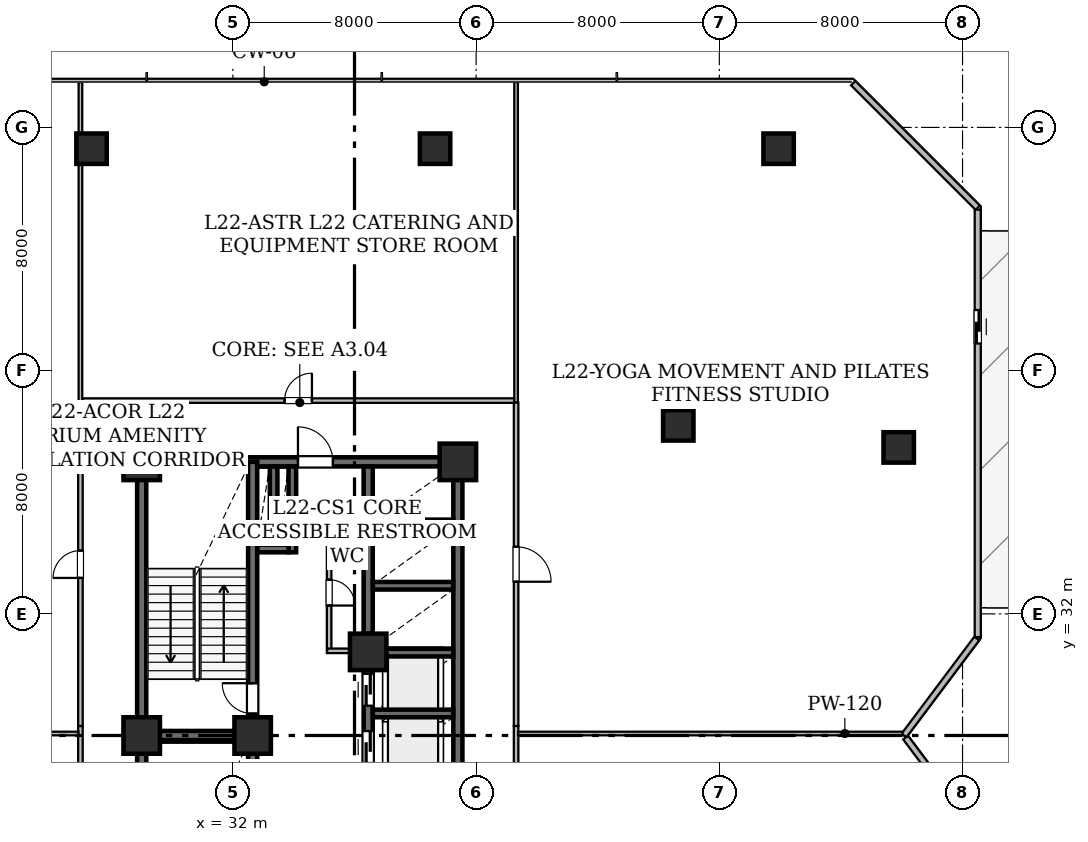
"""IFC4 building model, lengths in metres.
Left out: names, types, materials, properties, quantities, classifications, styles, units other than length and angle.
Written with IfcOpenShell. Run it as: python <this file> out.ifc"""

import sys

from ifc_helpers import new_model, si_unit, direction, frame, frame_2d, origin, origin_2d, place, context, subcontext, project, spatial, rectangle, hollow_rectangle, extrude, element, fill, save


model = new_model("IFC4")
c1 = context("Model", 3, precision=1e-05, world=origin(), true_north=direction((0.0, 1.0)))
c2 = subcontext(c1, "Body", "Model", "MODEL_VIEW")
j1 = project(units=[si_unit("LENGTHUNIT", "METRE"), si_unit("PLANEANGLEUNIT", "RADIAN")], contexts=[c1])
p1 = place(None, origin())
s1 = spatial("IfcSite", under=j1, at=p1, CompositionType="ELEMENT")
p2 = place(p1, origin())
s2 = spatial("IfcBuilding", under=s1, at=p2, CompositionType="ELEMENT")
p3 = place(p2, frame((0.0, 0.0, 89.8)))
s3 = spatial("IfcBuildingStorey", under=s2, at=p3, CompositionType="ELEMENT", Elevation=89.8)
for number, where, z_axis, x_axis in (
    (1, (32.65, 28.0, 0.0), (0.0, 0.0, 1.0), (1.0, 0.0, 0.0)),
    (2, (29.0, 28.0, 0.0), (0.0, 0.0, 1.0), (1.0, 0.0, 0.0)),
    (3, (29.0, 37.0, 0.0), (0.0, 0.0, 1.0), (1.0, 0.0, 0.0)),
    (4, (36.45, 30.75, 0.0), (0.0, 0.0, 1.0), (1.0, 0.0, 0.0)),
    (5, (39.4, 37.0, 0.0), (0.0, 0.0, 1.0), (1.0, 0.0, 0.0)),
):
    element("IfcColumn", number, at=place(p3, frame(where, z_axis=z_axis, x_axis=x_axis)), inside=s3, PredefinedType="COLUMN", context=c2, shape_type="SweptSolid", body=[
        extrude(hollow_rectangle(XDim=1.2, YDim=1.2, WallThickness=0.06, at=origin_2d()), origin(), (0.0, 0.0, 1.0), 4.8),
    ])
for number, where, z_axis, x_axis in (
    (6, (27.35, 47.3, 0.025), (0.0, 0.0, 1.0), (1.0, 0.0, 0.0)),
    (7, (38.65, 47.3, 0.025), (0.0, 0.0, 1.0), (1.0, 0.0, 0.0)),
    (8, (49.95, 47.3, 0.025), (0.0, 0.0, 1.0), (1.0, 0.0, 0.0)),
    (9, (53.9, 37.475, 0.025), (0.0, 0.0, 1.0), (1.0, 0.0, 0.0)),
    (10, (46.65, 38.2, 0.025), (0.0, 0.0, 1.0), (1.0, 0.0, 0.0)),
):
    element("IfcColumn", number, at=place(p3, frame(where, z_axis=z_axis, x_axis=x_axis)), inside=s3, PredefinedType="COLUMN", context=c2, shape_type="SweptSolid", body=[
        extrude(hollow_rectangle(XDim=1.0, YDim=1.0, WallThickness=0.05, at=origin_2d()), origin(), (0.0, 0.0, 1.0), 4.775),
    ])
p4 = place(p3, frame((52.404, 49.455, 0.0), z_axis=(0.0, 0.0, 1.0), x_axis=(0.707085707805, -0.70712785394, 0.0)))
e11 = element("IfcWall", 11, at=p4, inside=s3, PredefinedType="STANDARD", context=c2, shape_type="SweptSolid", body=[
    extrude(rectangle(XDim=5.793, YDim=0.2, at=frame_2d((2.896, 0.0))), origin(), (0.0, 0.0, 1.0), 4.58),
])
p5 = place(p3, frame((56.5, 45.296, 0.0), z_axis=(0.0, 0.0, 1.0), x_axis=(0.0, -1.0, 0.0)))
e12 = element("IfcWall", 12, at=p5, inside=s3, PredefinedType="STANDARD", context=c2, shape_type="SweptSolid", body=[
    extrude(rectangle(XDim=14.063, YDim=0.2, at=frame_2d((7.031, 0.0))), origin(), (0.0, 0.0, 1.0), 4.58),
])
p6 = place(p5, frame((3.303, 0.0, 0.0)))
e13 = element("IfcOpeningElement", 13, at=p6, cuts=e12, PredefinedType="OPENING", context=c2, shape_type="SweptSolid", body=[
    extrude(rectangle(XDim=1.1, YDim=2.2, at=frame_2d((0.55, 1.1))), frame((0.0, 0.11, 0.0), z_axis=(0.0, -1.0, 0.0), x_axis=(1.0, 0.0, 0.0)), (0.0, 0.0, 1.0), 0.22),
])
p7 = place(p3, frame((56.469, 31.191, 0.0), z_axis=(0.0, 0.0, 1.0), x_axis=(-0.600137081448, -0.799897170561, 0.0)))
e14 = element("IfcWall", 14, at=p7, inside=s3, PredefinedType="STANDARD", context=c2, shape_type="SweptSolid", body=[
    extrude(rectangle(XDim=3.989, YDim=0.2, at=frame_2d((1.995, 0.0))), origin(), (0.0, 0.0, 1.0), 4.58),
])
p8 = place(p3, frame((54.127, 27.931, 0.0), z_axis=(0.0, 0.0, 1.0), x_axis=(0.600029630681, -0.799977776132, 0.0)))
e15 = element("IfcWall", 15, at=p8, inside=s3, PredefinedType="STANDARD", context=c2, shape_type="SweptSolid", body=[
    extrude(rectangle(XDim=3.955, YDim=0.2, at=frame_2d((1.978, 0.0))), origin(), (0.0, 0.0, 1.0), 4.58),
])
for number, where, z_axis, x_axis in (
    (16, (29.0, 19.0, 0.0), (0.0, 0.0, 1.0), (0.0, 1.0, 0.0)),
    (17, (29.0, 28.0, 0.0), (0.0, 0.0, 1.0), (0.0, 1.0, 0.0)),
):
    element("IfcWall", number, at=place(p3, frame(where, z_axis=z_axis, x_axis=x_axis)), inside=s3, PredefinedType="SHEAR", context=c2, shape_type="SweptSolid", body=[
        extrude(rectangle(XDim=9.0, YDim=0.3, at=frame_2d((4.5, 0.0))), origin(), (0.0, 0.0, 1.0), 4.58),
    ])
p9 = place(p3, frame((29.0, 37.0, 0.0), z_axis=(0.0, 0.0, 1.0), x_axis=(1.0, 0.0, 0.0)))
e18 = element("IfcWall", 18, at=p9, inside=s3, PredefinedType="SHEAR", context=c2, shape_type="SweptSolid", body=[
    extrude(rectangle(XDim=10.4, YDim=0.3, at=frame_2d((5.2, 0.0))), origin(), (0.0, 0.0, 1.0), 4.58),
])
p10 = place(p9, frame((5.14, 0.0, 0.0)))
e19 = element("IfcOpeningElement", 19, at=p10, cuts=e18, PredefinedType="OPENING", context=c2, shape_type="SweptSolid", body=[
    extrude(rectangle(XDim=1.15, YDim=2.2, at=frame_2d((0.575, 1.1))), frame((0.0, 0.16, 0.0), z_axis=(0.0, -1.0, 0.0), x_axis=(1.0, 0.0, 0.0)), (0.0, 0.0, 1.0), 0.32),
])
p11 = place(p3, frame((39.4, 24.4, 0.0), z_axis=(0.0, 0.0, 1.0), x_axis=(0.0, 1.0, 0.0)))
e20 = element("IfcWall", 20, at=p11, inside=s3, PredefinedType="SHEAR", context=c2, shape_type="SweptSolid", body=[
    extrude(rectangle(XDim=12.6, YDim=0.3, at=frame_2d((6.3, 0.0))), origin(), (0.0, 0.0, 1.0), 4.58),
])
p12 = place(p3, frame((32.65, 19.0, 0.0), z_axis=(0.0, 0.0, 1.0), x_axis=(0.0, 1.0, 0.0)))
e21 = element("IfcWall", 21, at=p12, inside=s3, PredefinedType="SHEAR", context=c2, shape_type="SweptSolid", body=[
    extrude(rectangle(XDim=9.0, YDim=0.3, at=frame_2d((4.5, 0.0))), origin(), (0.0, 0.0, 1.0), 4.58),
])
p13 = place(p12, frame((0.72, 0.0, 0.0)))
e22 = element("IfcOpeningElement", 22, at=p13, cuts=e21, PredefinedType="OPENING", context=c2, shape_type="SweptSolid", body=[
    extrude(rectangle(XDim=1.0, YDim=2.15, at=frame_2d((0.5, 1.075))), frame((0.0, 0.16, 0.0), z_axis=(0.0, -1.0, 0.0), x_axis=(1.0, 0.0, 0.0)), (0.0, 0.0, 1.0), 0.32),
])
p14 = place(p3, frame((32.65, 28.0, 0.0), z_axis=(0.0, 0.0, 1.0), x_axis=(0.0, 1.0, 0.0)))
e23 = element("IfcWall", 23, at=p14, inside=s3, PredefinedType="SHEAR", context=c2, shape_type="SweptSolid", body=[
    extrude(rectangle(XDim=9.0, YDim=0.3, at=frame_2d((4.5, 0.0))), origin(), (0.0, 0.0, 1.0), 4.58),
])
p15 = place(p14, frame((0.72, 0.0, 0.0)))
e24 = element("IfcOpeningElement", 24, at=p15, cuts=e23, PredefinedType="OPENING", context=c2, shape_type="SweptSolid", body=[
    extrude(rectangle(XDim=1.0, YDim=2.15, at=frame_2d((0.5, 1.075))), frame((0.0, 0.16, 0.0), z_axis=(0.0, -1.0, 0.0), x_axis=(1.0, 0.0, 0.0)), (0.0, 0.0, 1.0), 0.32),
])
p16 = place(p3, frame((29.0, 28.0, 0.0), z_axis=(0.0, 0.0, 1.0), x_axis=(1.0, 0.0, 0.0)))
e25 = element("IfcWall", 25, at=p16, inside=s3, PredefinedType="SHEAR", context=c2, shape_type="SweptSolid", body=[
    extrude(rectangle(XDim=3.65, YDim=0.3, at=frame_2d((1.825, 0.0))), origin(), (0.0, 0.0, 1.0), 4.58),
])
p17 = place(p3, frame((36.45, 25.0, 0.0), z_axis=(0.0, 0.0, 1.0), x_axis=(0.0, 1.0, 0.0)))
e26 = element("IfcWall", 26, at=p17, inside=s3, PredefinedType="SHEAR", context=c2, shape_type="SweptSolid", body=[
    extrude(rectangle(XDim=5.15, YDim=0.3, at=frame_2d((2.575, 0.0))), origin(), (0.0, 0.0, 1.0), 4.58),
])
p18 = place(p17, frame((0.12, 0.0, 0.0)))
e27 = element("IfcOpeningElement", 27, at=p18, cuts=e26, PredefinedType="OPENING", context=c2, shape_type="SweptSolid", body=[
    extrude(rectangle(XDim=1.05, YDim=2.15, at=frame_2d((0.525, 1.075))), frame((0.0, 0.16, 0.0), z_axis=(0.0, -1.0, 0.0), x_axis=(1.0, 0.0, 0.0)), (0.0, 0.0, 1.0), 0.32),
])
p19 = place(p17, frame((2.095, 0.0, 0.0)))
e28 = element("IfcOpeningElement", 28, at=p19, cuts=e26, PredefinedType="OPENING", context=c2, shape_type="SweptSolid", body=[
    extrude(rectangle(XDim=1.05, YDim=2.15, at=frame_2d((0.525, 1.075))), frame((0.0, 0.16, 0.0), z_axis=(0.0, -1.0, 0.0), x_axis=(1.0, 0.0, 0.0)), (0.0, 0.0, 1.0), 0.32),
])
p20 = place(p17, frame((3.98, 0.0, 0.0)))
e29 = element("IfcOpeningElement", 29, at=p20, cuts=e26, PredefinedType="OPENING", context=c2, shape_type="SweptSolid", body=[
    extrude(rectangle(XDim=1.05, YDim=2.15, at=frame_2d((0.525, 1.075))), frame((0.0, 0.16, 0.0), z_axis=(0.0, -1.0, 0.0), x_axis=(1.0, 0.0, 0.0)), (0.0, 0.0, 1.0), 0.32),
])
p21 = place(p3, frame((36.45, 31.35, 0.0), z_axis=(0.0, 0.0, 1.0), x_axis=(0.0, 1.0, 0.0)))
e30 = element("IfcWall", 30, at=p21, inside=s3, PredefinedType="SHEAR", context=c2, shape_type="SweptSolid", body=[
    extrude(rectangle(XDim=5.496, YDim=0.3, at=frame_2d((2.748, 0.0))), origin(), (0.0, 0.0, 1.0), 4.58),
])
for number, where, z_axis, x_axis in (
    (31, (36.604, 28.725, 0.0), (0.0, 0.0, 1.0), (1.0, 0.0, 0.0)),
    (32, (36.604, 30.725, 0.0), (0.0, 0.0, 1.0), (1.0, 0.0, 0.0)),
    (33, (36.604, 32.925, 0.0), (0.0, 0.0, 1.0), (1.0, 0.0, 0.0)),
    (34, (36.604, 34.975, 0.0), (0.0, 0.0, 1.0), (1.0, 0.0, 0.0)),
):
    element("IfcWall", number, at=place(p3, frame(where, z_axis=z_axis, x_axis=x_axis)), inside=s3, PredefinedType="SHEAR", context=c2, shape_type="SweptSolid", body=[
        extrude(rectangle(XDim=2.642, YDim=0.25, at=frame_2d((1.321, 0.0))), origin(), (0.0, 0.0, 1.0), 4.58),
    ])
p22 = place(p3, frame((33.955, 34.025, 0.0), z_axis=(0.0, 0.0, 1.0), x_axis=(0.0, 1.0, 0.0)))
e35 = element("IfcWall", 35, at=p22, inside=s3, PredefinedType="SHEAR", context=c2, shape_type="SweptSolid", body=[
    extrude(rectangle(XDim=2.821, YDim=0.25, at=frame_2d((1.411, 0.0))), origin(), (0.0, 0.0, 1.0), 4.58),
])
p23 = place(p3, frame((32.804, 34.15, 0.0), z_axis=(0.0, 0.0, 1.0), x_axis=(1.0, 0.0, 0.0)))
e36 = element("IfcWall", 36, at=p23, inside=s3, PredefinedType="SHEAR", context=c2, shape_type="SweptSolid", body=[
    extrude(rectangle(XDim=1.022, YDim=0.25, at=frame_2d((0.511, 0.0))), origin(), (0.0, 0.0, 1.0), 4.58),
])
p24 = place(p3, frame((33.34, 34.279, 0.0), z_axis=(0.0, 0.0, 1.0), x_axis=(0.0, 1.0, 0.0)))
e37 = element("IfcWall", 37, at=p24, inside=s3, PredefinedType="SHEAR", context=c2, shape_type="SweptSolid", body=[
    extrude(rectangle(XDim=2.567, YDim=0.25, at=frame_2d((1.283, 0.0))), origin(), (0.0, 0.0, 1.0), 4.58),
])
p25 = place(p3, frame((36.306, 34.615, 0.0), z_axis=(0.0, 0.0, 1.0), x_axis=(-1.0, 0.0, 0.0)))
e38 = element("IfcWall", 38, at=p25, inside=s3, PredefinedType="STANDARD", context=c2, shape_type="SweptSolid", body=[
    extrude(rectangle(XDim=1.206, YDim=0.15, at=frame_2d((0.603, 0.0))), origin(), (0.0, 0.0, 1.0), 4.58),
])
p26 = place(p3, frame((35.165, 34.678, 0.0), z_axis=(0.0, 0.0, 1.0), x_axis=(0.0, -1.0, 0.0)))
e39 = element("IfcWall", 39, at=p26, inside=s3, PredefinedType="STANDARD", context=c2, shape_type="SweptSolid", body=[
    extrude(rectangle(XDim=3.958, YDim=0.15, at=frame_2d((1.979, 0.0))), origin(), (0.0, 0.0, 1.0), 4.58),
])
p27 = place(p26, frame((1.554, 0.0, 0.0)))
e40 = element("IfcOpeningElement", 40, at=p27, cuts=e39, PredefinedType="OPENING", context=c2, shape_type="SweptSolid", body=[
    extrude(rectangle(XDim=0.85, YDim=2.1, at=frame_2d((0.425, 1.05))), frame((0.0, 0.085, 0.0), z_axis=(0.0, -1.0, 0.0), x_axis=(1.0, 0.0, 0.0)), (0.0, 0.0, 1.0), 0.17),
])
p28 = place(p3, frame((35.102, 30.785, 0.0), z_axis=(0.0, 0.0, 1.0), x_axis=(1.0, 0.0, 0.0)))
e41 = element("IfcWall", 41, at=p28, inside=s3, PredefinedType="STANDARD", context=c2, shape_type="SweptSolid", body=[
    extrude(rectangle(XDim=1.198, YDim=0.15, at=frame_2d((0.599, 0.0))), origin(), (0.0, 0.0, 1.0), 4.58),
])
p29 = place(p3, frame((41.315, 28.314, 0.0), z_axis=(0.0, 0.0, 1.0), x_axis=(0.0, -1.0, 0.0)))
e42 = element("IfcWall", 42, at=p29, inside=s3, PredefinedType="STANDARD", context=c2, shape_type="SweptSolid", body=[
    extrude(rectangle(XDim=11.264, YDim=0.15, at=frame_2d((5.632, 0.0))), origin(), (0.0, 0.0, 1.0), 3.797),
])
p30 = place(p29, frame((5.203, 0.0, 0.0)))
e43 = element("IfcOpeningElement", 43, at=p30, cuts=e42, PredefinedType="OPENING", context=c2, shape_type="SweptSolid", body=[
    extrude(rectangle(XDim=0.9, YDim=2.1, at=frame_2d((0.45, 1.05))), frame((0.0, 0.085, 0.0), z_axis=(0.0, -1.0, 0.0), x_axis=(1.0, 0.0, 0.0)), (0.0, 0.0, 1.0), 0.17),
])
p31 = place(p3, frame((26.985, 17.05, 0.0), z_axis=(0.0, 0.0, 1.0), x_axis=(0.0, 1.0, 0.0)))
e44 = element("IfcWall", 44, at=p31, inside=s3, PredefinedType="STANDARD", context=c2, shape_type="SweptSolid", body=[
    extrude(rectangle(XDim=11.264, YDim=0.15, at=frame_2d((5.632, 0.0))), origin(), (0.0, 0.0, 1.0), 3.797),
])
p32 = place(p31, frame((5.036, 0.0, 0.0)))
e45 = element("IfcOpeningElement", 45, at=p32, cuts=e44, PredefinedType="OPENING", context=c2, shape_type="SweptSolid", body=[
    extrude(rectangle(XDim=1.15, YDim=2.2, at=frame_2d((0.575, 1.1))), frame((0.0, 0.085, 0.0), z_axis=(0.0, -1.0, 0.0), x_axis=(1.0, 0.0, 0.0)), (0.0, 0.0, 1.0), 0.17),
])
p33 = place(p3, frame((26.985, 28.314, 0.0), z_axis=(0.0, 0.0, 1.0), x_axis=(0.0, 1.0, 0.0)))
e46 = element("IfcWall", 46, at=p33, inside=s3, PredefinedType="STANDARD", context=c2, shape_type="SweptSolid", body=[
    extrude(rectangle(XDim=10.636, YDim=0.15, at=frame_2d((5.318, 0.0))), origin(), (0.0, 0.0, 1.0), 3.797),
])
p34 = place(p33, frame((4.868, 0.0, 0.0)))
e47 = element("IfcOpeningElement", 47, at=p34, cuts=e46, PredefinedType="OPENING", context=c2, shape_type="SweptSolid", body=[
    extrude(rectangle(XDim=0.9, YDim=2.1, at=frame_2d((0.45, 1.05))), frame((0.0, 0.085, 0.0), z_axis=(0.0, -1.0, 0.0), x_axis=(1.0, 0.0, 0.0)), (0.0, 0.0, 1.0), 0.17),
])
p35 = place(p3, frame((41.315, 38.95, 0.0), z_axis=(0.0, 0.0, 1.0), x_axis=(0.0, -1.0, 0.0)))
e48 = element("IfcWall", 48, at=p35, inside=s3, PredefinedType="STANDARD", context=c2, shape_type="SweptSolid", body=[
    extrude(rectangle(XDim=10.636, YDim=0.15, at=frame_2d((5.318, 0.0))), origin(), (0.0, 0.0, 1.0), 3.797),
])
p36 = place(p35, frame((4.743, 0.0, 0.0)))
e49 = element("IfcOpeningElement", 49, at=p36, cuts=e48, PredefinedType="OPENING", context=c2, shape_type="SweptSolid", body=[
    extrude(rectangle(XDim=1.15, YDim=2.2, at=frame_2d((0.575, 1.1))), frame((0.0, 0.085, 0.0), z_axis=(0.0, -1.0, 0.0), x_axis=(1.0, 0.0, 0.0)), (0.0, 0.0, 1.0), 0.17),
])
p37 = place(p3, frame((27.05, 39.015, 0.0), z_axis=(0.0, 0.0, 1.0), x_axis=(1.0, 0.0, 0.0)))
e50 = element("IfcWall", 50, at=p37, inside=s3, PredefinedType="STANDARD", context=c2, shape_type="SweptSolid", body=[
    extrude(rectangle(XDim=14.2, YDim=0.15, at=frame_2d((7.1, 0.0))), origin(), (0.0, 0.0, 1.0), 3.797),
])
p38 = place(p37, frame((6.65, 0.0, 0.0)))
e51 = element("IfcOpeningElement", 51, at=p38, cuts=e50, PredefinedType="OPENING", context=c2, shape_type="SweptSolid", body=[
    extrude(rectangle(XDim=0.9, YDim=2.1, at=frame_2d((0.45, 1.05))), frame((0.0, 0.085, 0.0), z_axis=(0.0, -1.0, 0.0), x_axis=(1.0, 0.0, 0.0)), (0.0, 0.0, 1.0), 0.17),
])
p39 = place(p3, frame((41.38, 28.065, 0.0), z_axis=(0.0, 0.0, 1.0), x_axis=(1.0, 0.0, 0.0)))
e52 = element("IfcWall", 52, at=p39, inside=s3, PredefinedType="PARTITIONING", context=c2, shape_type="SweptSolid", body=[
    extrude(rectangle(XDim=12.645, YDim=0.12, at=frame_2d((6.323, 0.0))), origin(), (0.0, 0.0, 1.0), 3.797),
])
p40 = place(p3, frame((11.928, 28.065, 0.0), z_axis=(0.0, 0.0, 1.0), x_axis=(1.0, 0.0, 0.0)))
e53 = element("IfcWall", 53, at=p40, inside=s3, PredefinedType="PARTITIONING", context=c2, shape_type="SweptSolid", body=[
    extrude(rectangle(XDim=14.99, YDim=0.12, at=frame_2d((7.495, 0.0))), origin(), (0.0, 0.0, 1.0), 3.797),
])
p41 = place(p3, frame((26.985, 49.49, 0.0), z_axis=(0.0, 0.0, 1.0), x_axis=(0.0, -1.0, 0.0)))
e54 = element("IfcWall", 54, at=p41, inside=s3, PredefinedType="PARTITIONING", context=c2, shape_type="SweptSolid", body=[
    extrude(rectangle(XDim=10.54, YDim=0.12, at=frame_2d((5.27, 0.0))), origin(), (0.0, 0.0, 1.0), 3.797),
])
p42 = place(p3, frame((41.315, 38.95, 0.0), z_axis=(0.0, 0.0, 1.0), x_axis=(0.0, 1.0, 0.0)))
e55 = element("IfcWall", 55, at=p42, inside=s3, PredefinedType="PARTITIONING", context=c2, shape_type="SweptSolid", body=[
    extrude(rectangle(XDim=10.54, YDim=0.12, at=frame_2d((5.27, 0.0))), origin(), (0.0, 0.0, 1.0), 4.026),
])
p43 = place(p6, origin())
e56 = element("IfcDoor", 56, at=p43, inside=s3, OperationType="SLIDING_TO_LEFT", PredefinedType="DOOR", context=c2, shape_type="SweptSolid", body=[
    extrude(rectangle(XDim=1.1, YDim=2.2, at=frame_2d((0.55, 1.1))), frame((0.0, 0.025, 0.0), z_axis=(0.0, -1.0, 0.0), x_axis=(1.0, 0.0, 0.0)), (0.0, 0.0, 1.0), 0.05),
])
fill(e13, e56)
p44 = place(p15, origin())
e57 = element("IfcDoor", 57, at=p44, inside=s3, OperationType="SINGLE_SWING_RIGHT", PredefinedType="DOOR", context=c2, shape_type="SweptSolid", body=[
    extrude(rectangle(XDim=1.0, YDim=2.15, at=frame_2d((0.5, 1.075))), frame((0.0, 0.025, 0.0), z_axis=(0.0, -1.0, 0.0), x_axis=(1.0, 0.0, 0.0)), (0.0, 0.0, 1.0), 0.05),
])
fill(e24, e57)
p45 = place(p10, origin())
e58 = element("IfcDoor", 58, at=p45, inside=s3, OperationType="SINGLE_SWING_LEFT", PredefinedType="DOOR", context=c2, shape_type="SweptSolid", body=[
    extrude(rectangle(XDim=1.15, YDim=2.2, at=frame_2d((0.575, 1.1))), frame((0.0, 0.025, 0.0), z_axis=(0.0, -1.0, 0.0), x_axis=(1.0, 0.0, 0.0)), (0.0, 0.0, 1.0), 0.05),
])
fill(e19, e58)
p46 = place(p19, origin())
e59 = element("IfcDoor", 59, at=p46, inside=s3, OperationType="SLIDING_TO_LEFT", PredefinedType="DOOR", context=c2, shape_type="SweptSolid", body=[
    extrude(rectangle(XDim=1.05, YDim=2.15, at=frame_2d((0.525, 1.075))), frame((0.0, 0.025, 0.0), z_axis=(0.0, -1.0, 0.0), x_axis=(1.0, 0.0, 0.0)), (0.0, 0.0, 1.0), 0.05),
])
fill(e28, e59)
p47 = place(p20, origin())
e60 = element("IfcDoor", 60, at=p47, inside=s3, OperationType="SLIDING_TO_LEFT", PredefinedType="DOOR", context=c2, shape_type="SweptSolid", body=[
    extrude(rectangle(XDim=1.05, YDim=2.15, at=frame_2d((0.525, 1.075))), frame((0.0, 0.025, 0.0), z_axis=(0.0, -1.0, 0.0), x_axis=(1.0, 0.0, 0.0)), (0.0, 0.0, 1.0), 0.05),
])
fill(e29, e60)
p48 = place(p27, origin())
e61 = element("IfcDoor", 61, at=p48, inside=s3, OperationType="SINGLE_SWING_RIGHT", PredefinedType="DOOR", context=c2, shape_type="SweptSolid", body=[
    extrude(rectangle(XDim=0.85, YDim=2.1, at=frame_2d((0.425, 1.05))), frame((0.0, 0.025, 0.0), z_axis=(0.0, -1.0, 0.0), x_axis=(1.0, 0.0, 0.0)), (0.0, 0.0, 1.0), 0.05),
])
fill(e40, e61)
p49 = place(p34, origin())
e62 = element("IfcDoor", 62, at=p49, inside=s3, OperationType="SINGLE_SWING_LEFT", PredefinedType="DOOR", context=c2, shape_type="SweptSolid", body=[
    extrude(rectangle(XDim=0.9, YDim=2.1, at=frame_2d((0.45, 1.05))), frame((0.0, 0.025, 0.0), z_axis=(0.0, -1.0, 0.0), x_axis=(1.0, 0.0, 0.0)), (0.0, 0.0, 1.0), 0.05),
])
fill(e47, e62)
p50 = place(p36, origin())
e63 = element("IfcDoor", 63, at=p50, inside=s3, OperationType="SINGLE_SWING_RIGHT", PredefinedType="DOOR", context=c2, shape_type="SweptSolid", body=[
    extrude(rectangle(XDim=1.15, YDim=2.2, at=frame_2d((0.575, 1.1))), frame((0.0, 0.025, 0.0), z_axis=(0.0, -1.0, 0.0), x_axis=(1.0, 0.0, 0.0)), (0.0, 0.0, 1.0), 0.05),
])
fill(e49, e63)
p51 = place(p38, origin())
e64 = element("IfcDoor", 64, at=p51, inside=s3, OperationType="SINGLE_SWING_RIGHT", PredefinedType="DOOR", context=c2, shape_type="SweptSolid", body=[
    extrude(rectangle(XDim=0.9, YDim=2.1, at=frame_2d((0.45, 1.05))), frame((0.0, 0.025, 0.0), z_axis=(0.0, -1.0, 0.0), x_axis=(1.0, 0.0, 0.0)), (0.0, 0.0, 1.0), 0.05),
])
fill(e51, e64)
save(model, sys.argv[1])
